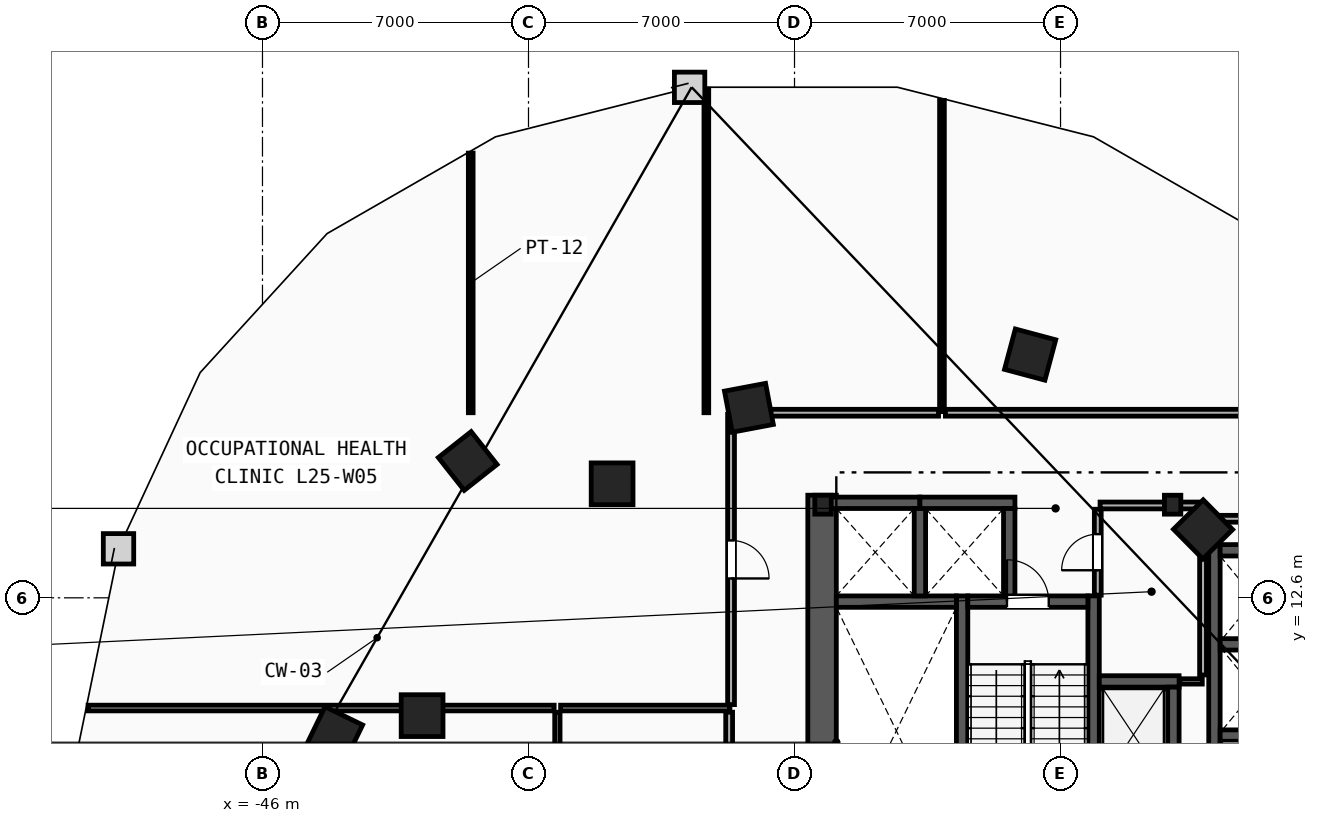
"""IFC4 building model, lengths in metres.
Left out: names, types, materials, properties, quantities, classifications, styles, units other than length and angle.
Written with IfcOpenShell. Run it as: python <this file> out.ifc"""

import sys

from ifc_helpers import new_model, si_unit, direction, frame, frame_2d, origin, origin_2d, place, context, subcontext, project, spatial, rectangle, i_section, extrude, element, fill, save


model = new_model("IFC4")
c1 = context("Model", 3, precision=1e-05, world=origin(), true_north=direction((0.0, 1.0)))
c2 = subcontext(c1, "Body", "Model", "MODEL_VIEW")
j1 = project(units=[si_unit("LENGTHUNIT", "METRE"), si_unit("PLANEANGLEUNIT", "RADIAN")], contexts=[c1])
p1 = place(None, origin())
s1 = spatial("IfcSite", under=j1, at=p1, CompositionType="ELEMENT")
p2 = place(p1, origin())
s2 = spatial("IfcBuilding", under=s1, at=p2, CompositionType="ELEMENT")
p3 = place(p2, frame((0.0, 0.0, 99.8)))
s3 = spatial("IfcBuildingStorey", under=s2, at=p3, CompositionType="ELEMENT", Elevation=99.8)
for number, where, z_axis, x_axis in (
    (1, (-22.05, 15.05, 0.0), (0.0, 0.0, 1.0), (1.0, 0.0, 0.0)),
    (2, (-31.25, 15.05, 0.0), (0.0, 0.0, 1.0), (1.0, 0.0, 0.0)),
):
    element("IfcColumn", number, at=place(p3, frame(where, z_axis=z_axis, x_axis=x_axis)), inside=s3, PredefinedType="COLUMN", context=c2, shape_type="SweptSolid", body=[
        extrude(i_section(OverallWidth=0.432, OverallDepth=0.498, WebThickness=0.056, FlangeThickness=0.089, FilletRadius=0.018, at=origin_2d()), origin(), (0.0, 0.0, 1.0), 3.6),
    ])
for number, where, z_axis, x_axis in (
    (3, (-41.8, 9.5, 0.0), (0.0, 0.0, 1.0), (1.0, 0.0, 0.0)),
    (4, (-36.8, 15.6, 0.0), (0.0, 0.0, 1.0), (1.0, 0.0, 0.0)),
    (5, (-21.25, 14.4, 0.0), (0.0, 0.0, 1.0), (-0.703, 0.711, 0.0)),
    (6, (-25.8, 19.0, 0.0), (0.0, 0.0, 1.0), (-0.966, 0.259, 0.0)),
    (7, (-33.2, 17.6, 0.0), (0.0, 0.0, 1.0), (-0.983, -0.186, 0.0)),
    (8, (-40.6, 16.2, 0.0), (0.0, 0.0, 1.0), (-0.785, -0.619, 0.0)),
    (9, (-44.1, 9.0, 0.0), (0.0, 0.0, 1.0), (-0.437, -0.899, 0.0)),
):
    element("IfcColumn", number, at=place(p3, frame(where, z_axis=z_axis, x_axis=x_axis)), inside=s3, PredefinedType="COLUMN", context=c2, shape_type="SweptSolid", body=[
        extrude(rectangle(XDim=1.1, YDim=1.1, at=origin_2d()), origin(), (0.0, 0.0, 1.0), 3.6),
    ])
p4 = place(p3, frame((-31.275, 1.97, 0.0), z_axis=(0.0, 0.0, 1.0), x_axis=(0.0, 1.0, 0.0)))
e10 = element("IfcWall", 10, at=p4, inside=s3, PredefinedType="SHEAR", context=c2, shape_type="SweptSolid", body=[
    extrude(rectangle(XDim=13.33, YDim=0.75, at=frame_2d((6.665, 0.0))), origin(), (0.0, 0.0, 1.0), 3.3),
])
for number, where, z_axis, x_axis in (
    (11, (-27.59, 1.97, 0.0), (0.0, 0.0, 1.0), (0.0, 1.0, 0.0)),
    (12, (-24.13, 1.97, 0.0), (0.0, 0.0, 1.0), (0.0, 1.0, 0.0)),
):
    element("IfcWall", number, at=place(p3, frame(where, z_axis=z_axis, x_axis=x_axis)), inside=s3, PredefinedType="SHEAR", context=c2, shape_type="SweptSolid", body=[
        extrude(rectangle(XDim=10.68, YDim=0.3, at=frame_2d((5.34, 0.0))), origin(), (0.0, 0.0, 1.0), 3.3),
    ])
p5 = place(p3, frame((-30.9, 12.5, 0.0), z_axis=(0.0, 0.0, 1.0), x_axis=(1.0, 0.0, 0.0)))
e13 = element("IfcWall", 13, at=p5, inside=s3, PredefinedType="SHEAR", context=c2, shape_type="SweptSolid", body=[
    extrude(rectangle(XDim=3.16, YDim=0.3, at=frame_2d((1.58, 0.0))), origin(), (0.0, 0.0, 1.0), 3.3),
])
p6 = place(p3, frame((-27.44, 12.5, 0.0), z_axis=(0.0, 0.0, 1.0), x_axis=(1.0, 0.0, 0.0)))
e14 = element("IfcWall", 14, at=p6, inside=s3, PredefinedType="SHEAR", context=c2, shape_type="SweptSolid", body=[
    extrude(rectangle(XDim=3.16, YDim=0.3, at=frame_2d((1.58, 0.0))), origin(), (0.0, 0.0, 1.0), 3.3),
])
p7 = place(p6, frame((1.03, 0.0, 0.0)))
e15 = element("IfcOpeningElement", 15, at=p7, cuts=e14, PredefinedType="OPENING", context=c2, shape_type="SweptSolid", body=[
    extrude(rectangle(XDim=1.1, YDim=2.15, at=frame_2d((0.55, 1.075))), frame((0.0, 0.16, 0.0), z_axis=(0.0, -1.0, 0.0), x_axis=(1.0, 0.0, 0.0)), (0.0, 0.0, 1.0), 0.32),
])
p8 = place(p3, frame((-23.98, 10.4, 0.0), z_axis=(0.0, 0.0, 1.0), x_axis=(1.0, 0.0, 0.0)))
e16 = element("IfcWall", 16, at=p8, inside=s3, PredefinedType="SHEAR", context=c2, shape_type="SweptSolid", body=[
    extrude(rectangle(XDim=2.1, YDim=0.3, at=frame_2d((1.05, 0.0))), origin(), (0.0, 0.0, 1.0), 3.3),
])
for number, where, z_axis, x_axis in (
    (17, (-22.03, 7.75, 0.0), (0.0, 0.0, 1.0), (0.0, 1.0, 0.0)),
    (18, (-31.2, 15.1, 0.0), (0.0, 0.0, 1.0), (1.0, 0.0, 0.0)),
):
    element("IfcWall", number, at=place(p3, frame(where, z_axis=z_axis, x_axis=x_axis)), inside=s3, PredefinedType="SHEAR", context=c2, shape_type="SweptSolid", body=[
        extrude(rectangle(XDim=2.5, YDim=0.3, at=frame_2d((1.25, 0.0))), origin(), (0.0, 0.0, 1.0), 3.3),
    ])
p9 = place(p3, frame((-28.7, 12.65, 0.0), z_axis=(0.0, 0.0, 1.0), x_axis=(0.0, 1.0, 0.0)))
e19 = element("IfcWall", 19, at=p9, inside=s3, PredefinedType="SHEAR", context=c2, shape_type="SweptSolid", body=[
    extrude(rectangle(XDim=2.3, YDim=0.3, at=frame_2d((1.15, 0.0))), origin(), (0.0, 0.0, 1.0), 3.3),
])
p10 = place(p3, frame((-28.7, 15.1, 0.0), z_axis=(0.0, 0.0, 1.0), x_axis=(1.0, 0.0, 0.0)))
e20 = element("IfcWall", 20, at=p10, inside=s3, PredefinedType="SHEAR", context=c2, shape_type="SweptSolid", body=[
    extrude(rectangle(XDim=2.5, YDim=0.3, at=frame_2d((1.25, 0.0))), origin(), (0.0, 0.0, 1.0), 3.3),
])
p11 = place(p3, frame((-26.35, 12.65, 0.0), z_axis=(0.0, 0.0, 1.0), x_axis=(0.0, 1.0, 0.0)))
e21 = element("IfcWall", 21, at=p11, inside=s3, PredefinedType="SHEAR", context=c2, shape_type="SweptSolid", body=[
    extrude(rectangle(XDim=2.3, YDim=0.3, at=frame_2d((1.15, 0.0))), origin(), (0.0, 0.0, 1.0), 3.3),
])
p12 = place(p3, frame((-20.95, 3.95, 0.0), z_axis=(0.0, 0.0, 1.0), x_axis=(0.0, 1.0, 0.0)))
e22 = element("IfcWall", 22, at=p12, inside=s3, PredefinedType="SHEAR", context=c2, shape_type="SweptSolid", body=[
    extrude(rectangle(XDim=10.05, YDim=0.3, at=frame_2d((5.025, 0.0))), origin(), (0.0, 0.0, 1.0), 3.3),
])
p13 = place(p3, frame((-20.8, 13.85, 0.0), z_axis=(0.0, 0.0, 1.0), x_axis=(1.0, 0.0, 0.0)))
e23 = element("IfcWall", 23, at=p13, inside=s3, PredefinedType="SHEAR", context=c2, shape_type="SweptSolid", body=[
    extrude(rectangle(XDim=2.15, YDim=0.3, at=frame_2d((1.075, 0.0))), origin(), (0.0, 0.0, 1.0), 3.3),
])
for number, where, z_axis, x_axis in (
    (24, (-20.8, 8.975, 0.0), (0.0, 0.0, 1.0), (1.0, 0.0, 0.0)),
    (25, (-20.8, 11.375, 0.0), (0.0, 0.0, 1.0), (1.0, 0.0, 0.0)),
):
    element("IfcWall", number, at=place(p3, frame(where, z_axis=z_axis, x_axis=x_axis)), inside=s3, PredefinedType="SHEAR", context=c2, shape_type="SweptSolid", body=[
        extrude(rectangle(XDim=1.85, YDim=0.3, at=frame_2d((0.925, 0.0))), origin(), (0.0, 0.0, 1.0), 3.3),
    ])
p14 = place(p3, frame((-21.86, 10.4, 0.0), z_axis=(0.0, 0.0, 1.0), x_axis=(1.0, 0.0, 0.0)))
e26 = element("IfcWall", 26, at=p14, inside=s3, PredefinedType="PARTITIONING", context=c2, shape_type="SweptSolid", body=[
    extrude(rectangle(XDim=0.59, YDim=0.14, at=frame_2d((0.295, 0.0))), origin(), (0.0, 0.0, 1.0), 3.3),
])
p15 = place(p3, frame((-21.25, 10.57, 0.0), z_axis=(0.0, 0.0, 1.0), x_axis=(0.0, 1.0, 0.0)))
e27 = element("IfcWall", 27, at=p15, inside=s3, PredefinedType="PARTITIONING", context=c2, shape_type="SweptSolid", body=[
    extrude(rectangle(XDim=4.36, YDim=0.18, at=frame_2d((2.18, 0.0))), origin(), (0.0, 0.0, 1.0), 3.3),
])
p16 = place(p3, frame((-23.96, 15.03, 0.0), z_axis=(0.0, 0.0, 1.0), x_axis=(1.0, 0.0, 0.0)))
e28 = element("IfcWall", 28, at=p16, inside=s3, PredefinedType="PARTITIONING", context=c2, shape_type="SweptSolid", body=[
    extrude(rectangle(XDim=2.61, YDim=0.18, at=frame_2d((1.305, 0.0))), origin(), (0.0, 0.0, 1.0), 2.373),
])
p17 = place(p3, frame((-24.02, 12.67, 0.0), z_axis=(0.0, 0.0, 1.0), x_axis=(0.0, 1.0, 0.0)))
e29 = element("IfcWall", 29, at=p17, inside=s3, PredefinedType="PARTITIONING", context=c2, shape_type="SweptSolid", body=[
    extrude(rectangle(XDim=2.26, YDim=0.18, at=frame_2d((1.13, 0.0))), origin(), (0.0, 0.0, 1.0), 3.3),
])
p18 = place(p17, frame((0.655, 0.0, 0.0)))
e30 = element("IfcOpeningElement", 30, at=p18, cuts=e29, PredefinedType="OPENING", context=c2, shape_type="SweptSolid", body=[
    extrude(rectangle(XDim=0.95, YDim=2.1, at=frame_2d((0.475, 1.05))), frame((0.0, 0.1, 0.0), z_axis=(0.0, -1.0, 0.0), x_axis=(1.0, 0.0, 0.0)), (0.0, 0.0, 1.0), 0.2),
])
p19 = place(p3, frame((-38.24, 5.415, 0.0), z_axis=(0.0, 0.0, 1.0), x_axis=(0.0, 1.0, 0.0)))
e31 = element("IfcWall", 31, at=p19, inside=s3, PredefinedType="PARTITIONING", context=c2, shape_type="SweptSolid", body=[
    extrude(rectangle(XDim=4.175, YDim=0.14, at=frame_2d((2.087, 0.0))), origin(), (0.0, 0.0, 1.0), 3.3),
])
p20 = place(p3, frame((-33.72, 5.43, 0.0), z_axis=(0.0, 0.0, 1.0), x_axis=(0.0, 1.0, 0.0)))
e32 = element("IfcWall", 32, at=p20, inside=s3, PredefinedType="PARTITIONING", context=c2, shape_type="SweptSolid", body=[
    extrude(rectangle(XDim=4.16, YDim=0.18, at=frame_2d((2.08, 0.0))), origin(), (0.0, 0.0, 1.0), 3.3),
])
p21 = place(p20, frame((1.58, 0.0, 0.0)))
e33 = element("IfcOpeningElement", 33, at=p21, cuts=e32, PredefinedType="OPENING", context=c2, shape_type="SweptSolid", body=[
    extrude(rectangle(XDim=1.0, YDim=2.15, at=frame_2d((0.5, 1.075))), frame((0.0, 0.1, 0.0), z_axis=(0.0, -1.0, 0.0), x_axis=(1.0, 0.0, 0.0)), (0.0, 0.0, 1.0), 0.2),
])
p22 = place(p3, frame((-50.589, 9.7, 0.0), z_axis=(0.0, 0.0, 1.0), x_axis=(1.0, 0.0, 0.0)))
e34 = element("IfcWall", 34, at=p22, inside=s3, PredefinedType="PARTITIONING", context=c2, shape_type="SweptSolid", body=[
    extrude(rectangle(XDim=12.264, YDim=0.15, at=frame_2d((6.132, 0.0))), origin(), (0.0, 0.0, 1.0), 3.3),
])
p23 = place(p3, frame((-38.155, 9.7, 0.0), z_axis=(0.0, 0.0, 1.0), x_axis=(1.0, 0.0, 0.0)))
e35 = element("IfcWall", 35, at=p23, inside=s3, PredefinedType="PARTITIONING", context=c2, shape_type="SweptSolid", body=[
    extrude(rectangle(XDim=4.455, YDim=0.15, at=frame_2d((2.228, 0.0))), origin(), (0.0, 0.0, 1.0), 3.3),
])
p24 = place(p3, frame((-40.52, 17.47, 0.0), z_axis=(0.0, 0.0, 1.0), x_axis=(0.0, 1.0, 0.0)))
e36 = element("IfcWall", 36, at=p24, inside=s3, PredefinedType="PARTITIONING", context=c2, shape_type="SweptSolid", body=[
    extrude(rectangle(XDim=6.831, YDim=0.125, at=frame_2d((3.416, 0.0))), origin(), (0.0, 0.0, 1.0), 3.3),
])
p25 = place(p3, frame((-34.32, 17.47, 0.0), z_axis=(0.0, 0.0, 1.0), x_axis=(0.0, 1.0, 0.0)))
e37 = element("IfcWall", 37, at=p25, inside=s3, PredefinedType="PARTITIONING", context=c2, shape_type="SweptSolid", body=[
    extrude(rectangle(XDim=8.515, YDim=0.125, at=frame_2d((4.258, 0.0))), origin(), (0.0, 0.0, 1.0), 3.3),
])
p26 = place(p3, frame((-28.12, 17.5, 0.0), z_axis=(0.0, 0.0, 1.0), x_axis=(0.0, 1.0, 0.0)))
e38 = element("IfcWall", 38, at=p26, inside=s3, PredefinedType="PARTITIONING", context=c2, shape_type="SweptSolid", body=[
    extrude(rectangle(XDim=8.188, YDim=0.125, at=frame_2d((4.094, 0.0))), origin(), (0.0, 0.0, 1.0), 3.3),
])
p27 = place(p3, frame((-16.822, 17.47, 0.0), z_axis=(0.0, 0.0, 1.0), x_axis=(-1.0, 0.0, 0.0)))
e39 = element("IfcWall", 39, at=p27, inside=s3, PredefinedType="PARTITIONING", context=c2, shape_type="SweptSolid", body=[
    extrude(rectangle(XDim=11.208, YDim=0.18, at=frame_2d((5.604, 0.0))), origin(), (0.0, 0.0, 1.0), 3.3),
])
p28 = place(p3, frame((-21.178, 14.68, 0.0), z_axis=(0.0, 0.0, 1.0), x_axis=(1.0, 0.0, 0.0)))
e40 = element("IfcWall", 40, at=p28, inside=s3, PredefinedType="PARTITIONING", context=c2, shape_type="SweptSolid", body=[
    extrude(rectangle(XDim=4.357, YDim=0.18, at=frame_2d((2.178, 0.0))), origin(), (0.0, 0.0, 1.0), 3.3),
])
p29 = place(p3, frame((-33.67, 17.428, 0.0), z_axis=(0.0, 0.0, 1.0), x_axis=(0.0, -1.0, 0.0)))
e41 = element("IfcWall", 41, at=p29, inside=s3, PredefinedType="PARTITIONING", context=c2, shape_type="SweptSolid", body=[
    extrude(rectangle(XDim=7.638, YDim=0.18, at=frame_2d((3.819, 0.0))), origin(), (0.0, 0.0, 1.0), 3.3),
])
p30 = place(p29, frame((3.319, 0.0, 0.0)))
e42 = element("IfcOpeningElement", 42, at=p30, cuts=e41, PredefinedType="OPENING", context=c2, shape_type="SweptSolid", body=[
    extrude(rectangle(XDim=1.0, YDim=2.15, at=frame_2d((0.5, 1.075))), frame((0.0, 0.1, 0.0), z_axis=(0.0, -1.0, 0.0), x_axis=(1.0, 0.0, 0.0)), (0.0, 0.0, 1.0), 0.2),
])
p31 = place(p3, frame((-28.21, 17.47, 0.0), z_axis=(0.0, 0.0, 1.0), x_axis=(-1.0, 0.0, 0.0)))
e43 = element("IfcWall", 43, at=p31, inside=s3, PredefinedType="PARTITIONING", context=c2, shape_type="SweptSolid", body=[
    extrude(rectangle(XDim=5.418, YDim=0.18, at=frame_2d((2.709, 0.0))), origin(), (0.0, 0.0, 1.0), 3.3),
])
p32 = place(p7, origin())
e44 = element("IfcDoor", 44, at=p32, inside=s3, OperationType="SINGLE_SWING_LEFT", PredefinedType="DOOR", context=c2, shape_type="SweptSolid", body=[
    extrude(rectangle(XDim=1.1, YDim=2.15, at=frame_2d((0.55, 1.075))), frame((0.0, 0.025, 0.0), z_axis=(0.0, -1.0, 0.0), x_axis=(1.0, 0.0, 0.0)), (0.0, 0.0, 1.0), 0.05),
])
fill(e15, e44)
p33 = place(p30, origin())
e45 = element("IfcDoor", 45, at=p33, inside=s3, OperationType="SINGLE_SWING_RIGHT", PredefinedType="DOOR", context=c2, shape_type="SweptSolid", body=[
    extrude(rectangle(XDim=1.0, YDim=2.15, at=frame_2d((0.5, 1.075))), frame((0.0, 0.025, 0.0), z_axis=(0.0, -1.0, 0.0), x_axis=(1.0, 0.0, 0.0)), (0.0, 0.0, 1.0), 0.05),
])
fill(e42, e45)
p34 = place(p18, origin())
e46 = element("IfcDoor", 46, at=p34, inside=s3, OperationType="SINGLE_SWING_LEFT", PredefinedType="DOOR", context=c2, shape_type="SweptSolid", body=[
    extrude(rectangle(XDim=0.95, YDim=2.1, at=frame_2d((0.475, 1.05))), frame((0.0, 0.025, 0.0), z_axis=(0.0, -1.0, 0.0), x_axis=(1.0, 0.0, 0.0)), (0.0, 0.0, 1.0), 0.05),
])
fill(e30, e46)
save(model, sys.argv[1])
